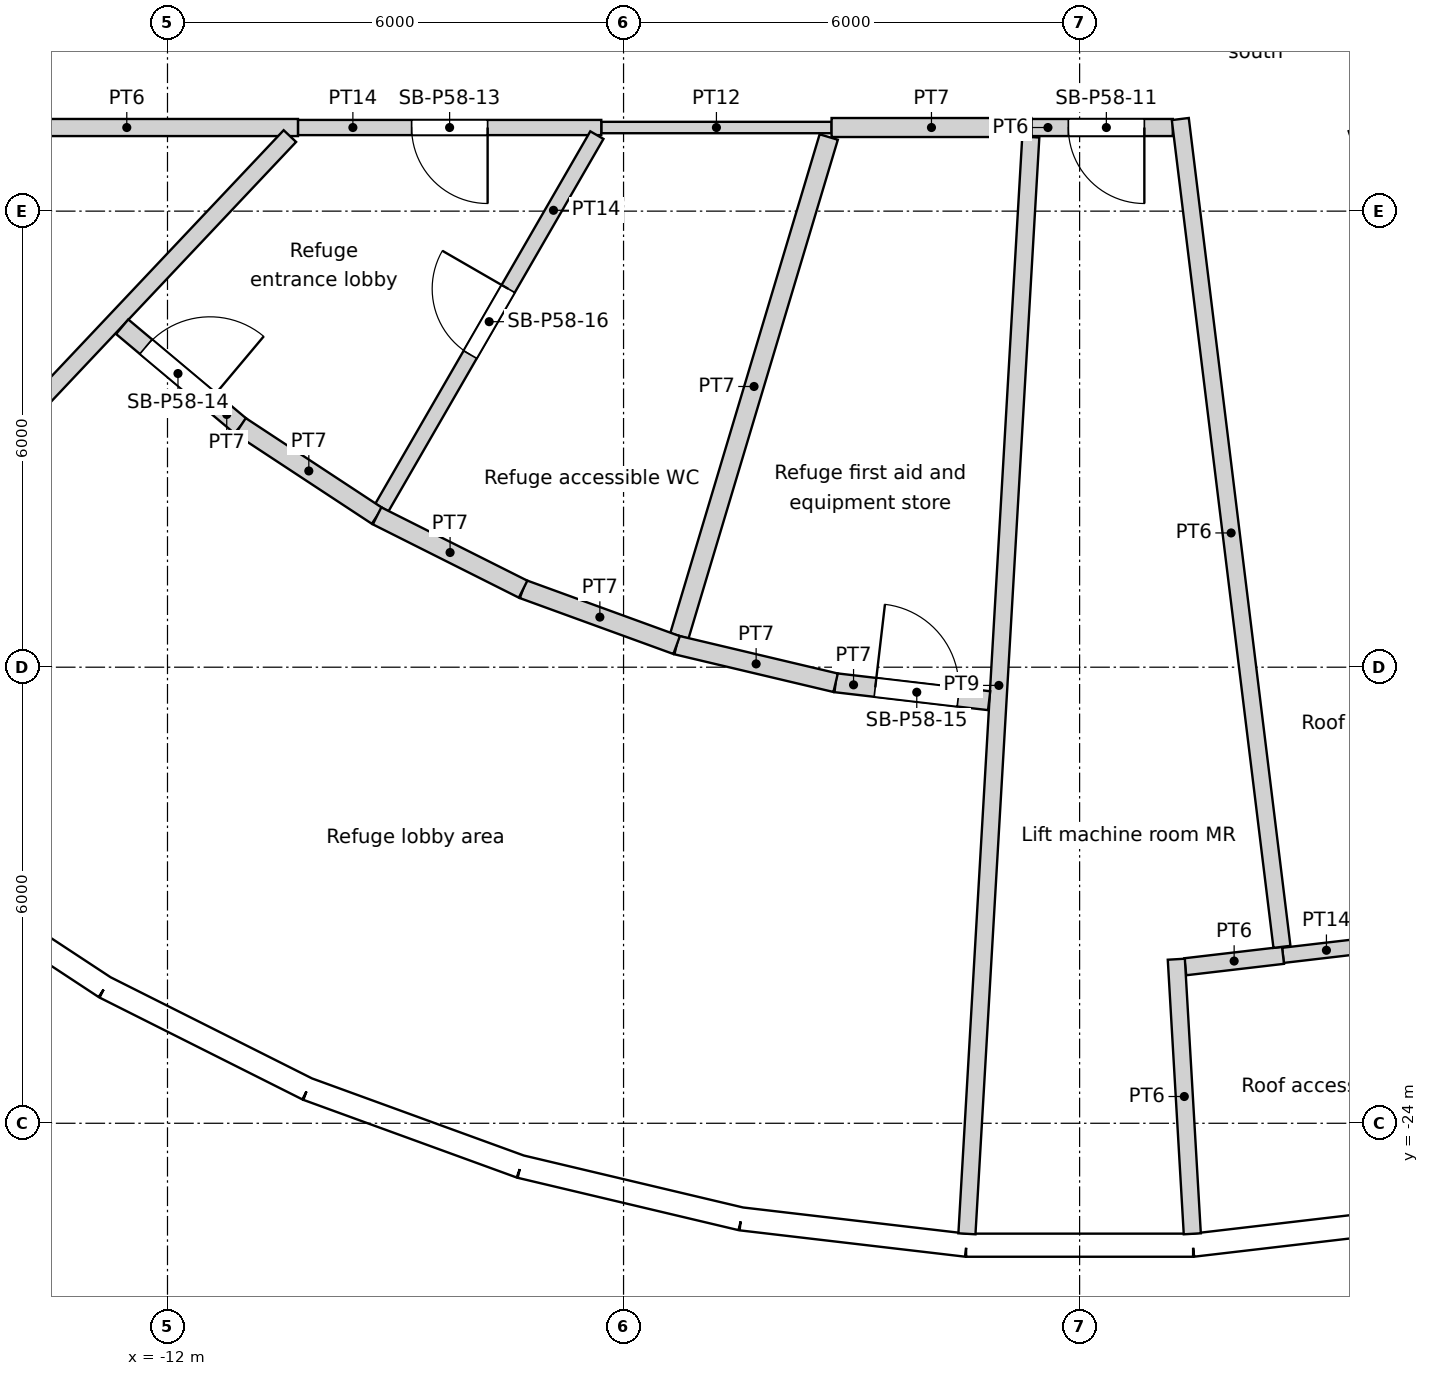
"""IFC4 building model, lengths in metres.
Left out: names, types, materials, properties, quantities, classifications, styles, units other than length and angle.
Written with IfcOpenShell. Run it as: python <this file> out.ifc"""

import sys

from ifc_helpers import new_model, si_unit, direction, frame, frame_2d, origin, origin_2d, place, context, subcontext, project, spatial, rectangle, circle, extrude, element, fill, save


model = new_model("IFC4")
c1 = context("Model", 3, precision=1e-05, world=origin(), true_north=direction((0.0, 1.0)))
c2 = subcontext(c1, "Body", "Model", "MODEL_VIEW")
j1 = project(units=[si_unit("LENGTHUNIT", "METRE"), si_unit("PLANEANGLEUNIT", "RADIAN")], contexts=[c1])
p1 = place(None, origin())
s1 = spatial("IfcSite", under=j1, at=p1, CompositionType="ELEMENT")
p2 = place(p1, origin())
s2 = spatial("IfcBuilding", under=s1, at=p2, CompositionType="ELEMENT")
p3 = place(p2, frame((0.0, 0.0, 225.0)))
s3 = spatial("IfcBuildingStorey", under=s2, at=p3, CompositionType="ELEMENT", Elevation=225.0)
for number, where, z_axis, x_axis in (
    (1, (-12.274, -21.259, 0.0), (0.0, 0.0, 1.0), (1.0, 0.0, 0.0)),
    (2, (-7.04, -23.516, 0.0), (0.0, 0.0, 1.0), (1.0, 0.0, 0.0)),
    (3, (-1.427, -24.506, 0.0), (0.0, 0.0, 1.0), (1.0, 0.0, 0.0)),
):
    element("IfcColumn", number, at=place(p3, frame(where, z_axis=z_axis, x_axis=x_axis)), inside=s3, PredefinedType="COLUMN", context=c2, shape_type="SweptSolid", body=[
        extrude(circle(Radius=0.6, at=origin_2d()), origin(), (0.0, 0.0, 1.0), 6.0),
    ])
for number, where, z_axis, x_axis in (
    (4, (-13.798, -12.802, 0.0), (0.0, 0.0, 1.0), (1.0, 0.0, 0.0)),
    (5, (-9.411, -16.301, 0.0), (0.0, 0.0, 1.0), (1.0, 0.0, 0.0)),
    (6, (-4.188, -18.35, 0.0), (0.0, 0.0, 1.0), (1.0, 0.0, 0.0)),
    (7, (1.406, -18.77, 0.0), (0.0, 0.0, 1.0), (1.0, 0.0, 0.0)),
):
    element("IfcColumn", number, at=place(p3, frame(where, z_axis=z_axis, x_axis=x_axis)), inside=s3, PredefinedType="COLUMN", context=c2, shape_type="SweptSolid", body=[
        extrude(circle(Radius=0.65, at=origin_2d()), origin(), (0.0, 0.0, 1.0), 6.0),
    ])
p4 = place(p3, frame((-15.316, -20.573, 0.0), z_axis=(0.0, 0.0, 1.0), x_axis=(0.835497187922, -0.549494721517, 0.0)))
e8 = element("IfcWall", 8, at=p4, inside=s3, PredefinedType="SOLIDWALL", context=c2, shape_type="SweptSolid", body=[
    extrude(rectangle(XDim=2.983, YDim=0.3, at=frame_2d((1.491, 0.0))), origin(), (0.0, 0.0, 1.0), 5.65),
])
p5 = place(p4, frame((1.491, 0.0, 1.825)))
e9 = element("IfcOpeningElement", 9, at=p5, cuts=e8, PredefinedType="OPENING", context=c2, shape_type="SweptSolid", body=[
    extrude(circle(Radius=1.2, at=origin_2d()), frame((0.0, 0.16, 0.0), z_axis=(0.0, -1.0, 0.0), x_axis=(1.0, 0.0, 0.0)), (0.0, 0.0, 1.0), 0.32),
])
p6 = place(p3, frame((-12.824, -22.211, 0.0), z_axis=(0.0, 0.0, 1.0), x_axis=(0.893656390984, -0.448751885626, 0.0)))
e10 = element("IfcWall", 10, at=p6, inside=s3, PredefinedType="SOLIDWALL", context=c2, shape_type="SweptSolid", body=[
    extrude(rectangle(XDim=2.982, YDim=0.3, at=frame_2d((1.491, 0.0))), origin(), (0.0, 0.0, 1.0), 5.65),
])
p7 = place(p6, frame((1.491, 0.0, 1.825)))
e11 = element("IfcOpeningElement", 11, at=p7, cuts=e10, PredefinedType="OPENING", context=c2, shape_type="SweptSolid", body=[
    extrude(circle(Radius=1.2, at=origin_2d()), frame((0.0, 0.16, 0.0), z_axis=(0.0, -1.0, 0.0), x_axis=(1.0, 0.0, 0.0)), (0.0, 0.0, 1.0), 0.32),
])
p8 = place(p3, frame((-10.158, -23.55, 0.0), z_axis=(0.0, 0.0, 1.0), x_axis=(0.939676264274, -0.342065079129, 0.0)))
e12 = element("IfcWall", 12, at=p8, inside=s3, PredefinedType="SOLIDWALL", context=c2, shape_type="SweptSolid", body=[
    extrude(rectangle(XDim=2.983, YDim=0.3, at=frame_2d((1.491, 0.0))), origin(), (0.0, 0.0, 1.0), 5.65),
])
p9 = place(p8, frame((1.491, 0.0, 1.825)))
e13 = element("IfcOpeningElement", 13, at=p9, cuts=e12, PredefinedType="OPENING", context=c2, shape_type="SweptSolid", body=[
    extrude(circle(Radius=1.2, at=origin_2d()), frame((0.0, 0.16, 0.0), z_axis=(0.0, -1.0, 0.0), x_axis=(1.0, 0.0, 0.0)), (0.0, 0.0, 1.0), 0.32),
])
p10 = place(p3, frame((-7.356, -24.57, 0.0), z_axis=(0.0, 0.0, 1.0), x_axis=(0.973049843813, -0.230594886012, 0.0)))
e14 = element("IfcWall", 14, at=p10, inside=s3, PredefinedType="SOLIDWALL", context=c2, shape_type="SweptSolid", body=[
    extrude(rectangle(XDim=2.982, YDim=0.3, at=frame_2d((1.491, 0.0))), origin(), (0.0, 0.0, 1.0), 5.65),
])
p11 = place(p10, frame((1.491, 0.0, 1.825)))
e15 = element("IfcOpeningElement", 15, at=p11, cuts=e14, PredefinedType="OPENING", context=c2, shape_type="SweptSolid", body=[
    extrude(circle(Radius=1.2, at=origin_2d()), frame((0.0, 0.16, 0.0), z_axis=(0.0, -1.0, 0.0), x_axis=(1.0, 0.0, 0.0)), (0.0, 0.0, 1.0), 0.32),
])
p12 = place(p3, frame((-4.454, -25.258, 0.0), z_axis=(0.0, 0.0, 1.0), x_axis=(0.993240822844, -0.116071821888, 0.0)))
e16 = element("IfcWall", 16, at=p12, inside=s3, PredefinedType="SOLIDWALL", context=c2, shape_type="SweptSolid", body=[
    extrude(rectangle(XDim=2.983, YDim=0.3, at=frame_2d((1.491, 0.0))), origin(), (0.0, 0.0, 1.0), 5.65),
])
p13 = place(p12, frame((1.491, 0.0, 1.825)))
e17 = element("IfcOpeningElement", 17, at=p13, cuts=e16, PredefinedType="OPENING", context=c2, shape_type="SweptSolid", body=[
    extrude(circle(Radius=1.2, at=origin_2d()), frame((0.0, 0.16, 0.0), z_axis=(0.0, -1.0, 0.0), x_axis=(1.0, 0.0, 0.0)), (0.0, 0.0, 1.0), 0.32),
])
p14 = place(p3, frame((-1.491, -25.604, 0.0), z_axis=(0.0, 0.0, 1.0), x_axis=(1.0, 0.0, 0.0)))
e18 = element("IfcWall", 18, at=p14, inside=s3, PredefinedType="SOLIDWALL", context=c2, shape_type="SweptSolid", body=[
    extrude(rectangle(XDim=2.982, YDim=0.3, at=frame_2d((1.491, 0.0))), origin(), (0.0, 0.0, 1.0), 5.65),
])
p15 = place(p14, frame((1.491, 0.0, 1.825)))
e19 = element("IfcOpeningElement", 19, at=p15, cuts=e18, PredefinedType="OPENING", context=c2, shape_type="SweptSolid", body=[
    extrude(circle(Radius=1.2, at=origin_2d()), frame((0.0, 0.16, 0.0), z_axis=(0.0, -1.0, 0.0), x_axis=(1.0, 0.0, 0.0)), (0.0, 0.0, 1.0), 0.32),
])
p16 = place(p3, frame((1.491, -25.604, 0.0), z_axis=(0.0, 0.0, 1.0), x_axis=(0.993240822844, 0.116071821888, 0.0)))
e20 = element("IfcWall", 20, at=p16, inside=s3, PredefinedType="SOLIDWALL", context=c2, shape_type="SweptSolid", body=[
    extrude(rectangle(XDim=2.983, YDim=0.3, at=frame_2d((1.491, 0.0))), origin(), (0.0, 0.0, 1.0), 5.65),
])
p17 = place(p16, frame((1.491, 0.0, 1.825)))
e21 = element("IfcOpeningElement", 21, at=p17, cuts=e20, PredefinedType="OPENING", context=c2, shape_type="SweptSolid", body=[
    extrude(circle(Radius=1.2, at=origin_2d()), frame((0.0, 0.16, 0.0), z_axis=(0.0, -1.0, 0.0), x_axis=(1.0, 0.0, 0.0)), (0.0, 0.0, 1.0), 0.32),
])
p18 = place(p3, frame((-17.497, -18.546, 0.0), z_axis=(0.0, 0.0, 1.0), x_axis=(0.686253135809, 0.727362793654, 0.0)))
e22 = element("IfcWall", 22, at=p18, inside=s3, PredefinedType="PARTITIONING", context=c2, shape_type="SweptSolid", body=[
    extrude(rectangle(XDim=10.357, YDim=0.225, at=frame_2d((5.179, 0.0))), origin(), (0.0, 0.0, 1.0), 2.7),
])
p19 = place(p3, frame((-14.788, -10.9, 0.0), z_axis=(0.0, 0.0, 1.0), x_axis=(1.0, 0.0, 0.0)))
e23 = element("IfcWall", 23, at=p19, inside=s3, PredefinedType="PARTITIONING", context=c2, shape_type="SweptSolid", body=[
    extrude(rectangle(XDim=4.504, YDim=0.225, at=frame_2d((2.252, 0.0))), origin(), (0.0, 0.0, 1.0), 5.2),
])
p20 = place(p3, frame((-11.039, -14.827, 0.0), z_axis=(0.0, 0.0, 1.0), x_axis=(-0.766021768974, 0.642814630713, 0.0)))
e24 = element("IfcWall", 24, at=p20, inside=s3, PredefinedType="PARTITIONING", context=c2, shape_type="SweptSolid", body=[
    extrude(rectangle(XDim=2.033, YDim=0.25, at=frame_2d((1.017, 0.0))), origin(), (0.0, 0.0, 1.0), 5.2),
])
p21 = place(p20, frame((0.525, 0.0, 0.0)))
e25 = element("IfcOpeningElement", 25, at=p21, cuts=e24, PredefinedType="OPENING", context=c2, shape_type="SweptSolid", body=[
    extrude(rectangle(XDim=1.1, YDim=2.1, at=frame_2d((0.55, 1.05))), frame((0.0, 0.125, 0.0), z_axis=(0.0, -1.0, 0.0), x_axis=(1.0, 0.0, 0.0)), (0.0, 0.0, 1.0), 0.25),
])
p22 = place(p3, frame((-11.039, -14.827, 0.0), z_axis=(0.0, 0.0, 1.0), x_axis=(0.835476081401, -0.549526812274, 0.0)))
e26 = element("IfcWall", 26, at=p22, inside=s3, PredefinedType="PARTITIONING", context=c2, shape_type="SweptSolid", body=[
    extrude(rectangle(XDim=2.15, YDim=0.25, at=frame_2d((1.075, 0.0))), origin(), (0.0, 0.0, 1.0), 5.2),
])
p23 = place(p3, frame((-10.284, -10.9, 0.0), z_axis=(0.0, 0.0, 1.0), x_axis=(1.0, 0.0, 0.0)))
e27 = element("IfcWall", 27, at=p23, inside=s3, PredefinedType="PARTITIONING", context=c2, shape_type="SweptSolid", body=[
    extrude(rectangle(XDim=3.99, YDim=0.2, at=frame_2d((1.995, 0.0))), origin(), (0.0, 0.0, 1.0), 5.2),
])
p24 = place(p23, frame((1.495, 0.0, 0.0)))
e28 = element("IfcOpeningElement", 28, at=p24, cuts=e27, PredefinedType="OPENING", context=c2, shape_type="SweptSolid", body=[
    extrude(rectangle(XDim=1.0, YDim=2.1, at=frame_2d((0.5, 1.05))), frame((0.0, 0.1, 0.0), z_axis=(0.0, -1.0, 0.0), x_axis=(1.0, 0.0, 0.0)), (0.0, 0.0, 1.0), 0.2),
])
p25 = place(p3, frame((-9.243, -16.009, 0.0), z_axis=(0.0, 0.0, 1.0), x_axis=(0.893653507888, -0.448757627055, 0.0)))
e29 = element("IfcWall", 29, at=p25, inside=s3, PredefinedType="PARTITIONING", context=c2, shape_type="SweptSolid", body=[
    extrude(rectangle(XDim=2.149, YDim=0.25, at=frame_2d((1.075, 0.0))), origin(), (0.0, 0.0, 1.0), 5.2),
])
p26 = place(p3, frame((-6.351, -11.0, 0.0), z_axis=(0.0, 0.0, 1.0), x_axis=(-0.500013765421, -0.866017456169, 0.0)))
e30 = element("IfcWall", 30, at=p26, inside=s3, PredefinedType="PARTITIONING", context=c2, shape_type="SweptSolid", body=[
    extrude(rectangle(XDim=5.658, YDim=0.2, at=frame_2d((2.829, 0.0))), origin(), (0.0, 0.0, 1.0), 5.2),
])
p27 = place(p26, frame((2.334, 0.0, 0.0)))
e31 = element("IfcOpeningElement", 31, at=p27, cuts=e30, PredefinedType="OPENING", context=c2, shape_type="SweptSolid", body=[
    extrude(rectangle(XDim=1.0, YDim=2.1, at=frame_2d((0.5, 1.05))), frame((0.0, 0.1, 0.0), z_axis=(0.0, -1.0, 0.0), x_axis=(1.0, 0.0, 0.0)), (0.0, 0.0, 1.0), 0.2),
])
p28 = place(p3, frame((-7.322, -16.973, 0.0), z_axis=(0.0, 0.0, 1.0), x_axis=(0.93967399384, -0.342071316104, 0.0)))
e32 = element("IfcWall", 32, at=p28, inside=s3, PredefinedType="PARTITIONING", context=c2, shape_type="SweptSolid", body=[
    extrude(rectangle(XDim=2.15, YDim=0.25, at=frame_2d((1.075, 0.0))), origin(), (0.0, 0.0, 1.0), 5.2),
])
p29 = place(p3, frame((-6.293, -10.9, 0.0), z_axis=(0.0, 0.0, 1.0), x_axis=(1.0, 0.0, 0.0)))
e33 = element("IfcWall", 33, at=p29, inside=s3, PredefinedType="PARTITIONING", context=c2, shape_type="SweptSolid", body=[
    extrude(rectangle(XDim=3.03, YDim=0.15, at=frame_2d((1.515, 0.0))), origin(), (0.0, 0.0, 1.0), 5.2),
])
p30 = place(p3, frame((-5.266, -17.589, 0.0), z_axis=(0.0, 0.0, 1.0), x_axis=(0.286831354486, 0.957981092759, 0.0)))
e34 = element("IfcWall", 34, at=p30, inside=s3, PredefinedType="PARTITIONING", context=c2, shape_type="SweptSolid", body=[
    extrude(rectangle(XDim=6.852, YDim=0.25, at=frame_2d((3.426, 0.0))), origin(), (0.0, 0.0, 1.0), 5.2),
])
p31 = place(p3, frame((-5.302, -17.709, 0.0), z_axis=(0.0, 0.0, 1.0), x_axis=(0.973036034562, -0.230653149649, 0.0)))
e35 = element("IfcWall", 35, at=p31, inside=s3, PredefinedType="PARTITIONING", context=c2, shape_type="SweptSolid", body=[
    extrude(rectangle(XDim=2.15, YDim=0.25, at=frame_2d((1.075, 0.0))), origin(), (0.0, 0.0, 1.0), 5.2),
])
p32 = place(p3, frame((-3.263, -10.9, 0.0), z_axis=(0.0, 0.0, 1.0), x_axis=(1.0, 0.0, 0.0)))
e36 = element("IfcWall", 36, at=p32, inside=s3, PredefinedType="PARTITIONING", context=c2, shape_type="SweptSolid", body=[
    extrude(rectangle(XDim=2.628, YDim=0.25, at=frame_2d((1.314, 0.0))), origin(), (0.0, 0.0, 1.0), 5.2),
])
p33 = place(p3, frame((-3.21, -18.205, 0.0), z_axis=(0.0, 0.0, 1.0), x_axis=(0.993238011892, -0.116095873021, 0.0)))
e37 = element("IfcWall", 37, at=p33, inside=s3, PredefinedType="PARTITIONING", context=c2, shape_type="SweptSolid", body=[
    extrude(rectangle(XDim=2.033, YDim=0.25, at=frame_2d((1.017, 0.0))), origin(), (0.0, 0.0, 1.0), 5.2),
])
p34 = place(p33, frame((0.525, 0.0, 0.0)))
e38 = element("IfcOpeningElement", 38, at=p34, cuts=e37, PredefinedType="OPENING", context=c2, shape_type="SweptSolid", body=[
    extrude(rectangle(XDim=1.1, YDim=2.1, at=frame_2d((0.55, 1.05))), frame((0.0, 0.125, 0.0), z_axis=(0.0, -1.0, 0.0), x_axis=(1.0, 0.0, 0.0)), (0.0, 0.0, 1.0), 0.25),
])
p35 = place(p3, frame((-1.482, -25.454, 0.0), z_axis=(0.0, 0.0, 1.0), x_axis=(0.058139787004, 0.998308451916, 0.0)))
e39 = element("IfcWall", 39, at=p35, inside=s3, PredefinedType="PARTITIONING", context=c2, shape_type="SweptSolid", body=[
    extrude(rectangle(XDim=14.454, YDim=0.225, at=frame_2d((7.227, 0.0))), origin(), (0.0, 0.0, 1.0), 2.7),
])
p36 = place(p3, frame((-0.635, -10.9, 0.0), z_axis=(0.0, 0.0, 1.0), x_axis=(1.0, 0.0, 0.0)))
e40 = element("IfcWall", 40, at=p36, inside=s3, PredefinedType="PARTITIONING", context=c2, shape_type="SweptSolid", body=[
    extrude(rectangle(XDim=1.861, YDim=0.225, at=frame_2d((0.93, 0.0))), origin(), (0.0, 0.0, 1.0), 5.2),
])
p37 = place(p36, frame((0.487, 0.0, 0.0)))
e41 = element("IfcOpeningElement", 41, at=p37, cuts=e40, PredefinedType="OPENING", context=c2, shape_type="SweptSolid", body=[
    extrude(rectangle(XDim=1.0, YDim=2.1, at=frame_2d((0.5, 1.05))), frame((0.0, 0.113, 0.0), z_axis=(0.0, -1.0, 0.0), x_axis=(1.0, 0.0, 0.0)), (0.0, 0.0, 1.0), 0.225),
])
p38 = place(p3, frame((1.39, -21.941, 0.0), z_axis=(0.0, 0.0, 1.0), x_axis=(0.993246843988, 0.11602028662, 0.0)))
e42 = element("IfcWall", 42, at=p38, inside=s3, PredefinedType="PARTITIONING", context=c2, shape_type="SweptSolid", body=[
    extrude(rectangle(XDim=1.294, YDim=0.225, at=frame_2d((0.647, 0.0))), origin(), (0.0, 0.0, 1.0), 5.2),
])
p39 = place(p3, frame((1.482, -25.454, 0.0), z_axis=(0.0, 0.0, 1.0), x_axis=(-0.058093127589, 0.998311168187, 0.0)))
e43 = element("IfcWall", 43, at=p39, inside=s3, PredefinedType="PARTITIONING", context=c2, shape_type="SweptSolid", body=[
    extrude(rectangle(XDim=3.618, YDim=0.225, at=frame_2d((1.809, 0.0))), origin(), (0.0, 0.0, 1.0), 5.2),
])
p40 = place(p3, frame((2.662, -21.679, 0.0), z_axis=(0.0, 0.0, 1.0), x_axis=(-0.121884764191, 0.992544258085, 0.0)))
e44 = element("IfcWall", 44, at=p40, inside=s3, PredefinedType="PARTITIONING", context=c2, shape_type="SweptSolid", body=[
    extrude(rectangle(XDim=10.973, YDim=0.225, at=frame_2d((5.486, 0.0))), origin(), (0.0, 0.0, 1.0), 5.2),
])
p41 = place(p3, frame((2.676, -21.791, 0.0), z_axis=(0.0, 0.0, 1.0), x_axis=(0.99324154859, 0.116065611425, 0.0)))
e45 = element("IfcWall", 45, at=p41, inside=s3, PredefinedType="PARTITIONING", context=c2, shape_type="SweptSolid", body=[
    extrude(rectangle(XDim=1.151, YDim=0.2, at=frame_2d((0.575, 0.0))), origin(), (0.0, 0.0, 1.0), 5.2),
])
p42 = place(p3, frame((7.076, -20.947, 0.0), z_axis=(0.0, 0.0, 1.0), x_axis=(-0.320044465118, 0.947402522874, 0.0)))
e46 = element("IfcWall", 46, at=p42, inside=s3, PredefinedType="PARTITIONING", context=c2, shape_type="SweptSolid", body=[
    extrude(rectangle(XDim=10.605, YDim=0.3, at=frame_2d((5.302, 0.0))), origin(), (0.0, 0.0, 1.0), 5.2),
])
p43 = place(p5, origin())
e47 = element("IfcWindow", 47, at=p43, inside=s3, PartitioningType="SINGLE_PANEL", PredefinedType="WINDOW", context=c2, shape_type="SweptSolid", body=[
    extrude(circle(Radius=1.2, at=origin_2d()), frame((0.0, 0.12, 0.0), z_axis=(0.0, -1.0, 0.0), x_axis=(1.0, 0.0, 0.0)), (0.0, 0.0, 1.0), 0.1),
])
fill(e9, e47)
p44 = place(p7, origin())
e48 = element("IfcWindow", 48, at=p44, inside=s3, PartitioningType="SINGLE_PANEL", PredefinedType="WINDOW", context=c2, shape_type="SweptSolid", body=[
    extrude(circle(Radius=1.2, at=origin_2d()), frame((0.0, 0.12, 0.0), z_axis=(0.0, -1.0, 0.0), x_axis=(1.0, 0.0, 0.0)), (0.0, 0.0, 1.0), 0.1),
])
fill(e11, e48)
p45 = place(p9, origin())
e49 = element("IfcWindow", 49, at=p45, inside=s3, PartitioningType="SINGLE_PANEL", PredefinedType="WINDOW", context=c2, shape_type="SweptSolid", body=[
    extrude(circle(Radius=1.2, at=origin_2d()), frame((0.0, 0.12, 0.0), z_axis=(0.0, -1.0, 0.0), x_axis=(1.0, 0.0, 0.0)), (0.0, 0.0, 1.0), 0.1),
])
fill(e13, e49)
p46 = place(p11, origin())
e50 = element("IfcWindow", 50, at=p46, inside=s3, PartitioningType="SINGLE_PANEL", PredefinedType="WINDOW", context=c2, shape_type="SweptSolid", body=[
    extrude(circle(Radius=1.2, at=origin_2d()), frame((0.0, 0.12, 0.0), z_axis=(0.0, -1.0, 0.0), x_axis=(1.0, 0.0, 0.0)), (0.0, 0.0, 1.0), 0.1),
])
fill(e15, e50)
p47 = place(p13, origin())
e51 = element("IfcWindow", 51, at=p47, inside=s3, PartitioningType="SINGLE_PANEL", PredefinedType="WINDOW", context=c2, shape_type="SweptSolid", body=[
    extrude(circle(Radius=1.2, at=origin_2d()), frame((0.0, 0.12, 0.0), z_axis=(0.0, -1.0, 0.0), x_axis=(1.0, 0.0, 0.0)), (0.0, 0.0, 1.0), 0.1),
])
fill(e17, e51)
p48 = place(p15, origin())
e52 = element("IfcWindow", 52, at=p48, inside=s3, PartitioningType="SINGLE_PANEL", PredefinedType="WINDOW", context=c2, shape_type="SweptSolid", body=[
    extrude(circle(Radius=1.2, at=origin_2d()), frame((0.0, 0.12, 0.0), z_axis=(0.0, -1.0, 0.0), x_axis=(1.0, 0.0, 0.0)), (0.0, 0.0, 1.0), 0.1),
])
fill(e19, e52)
p49 = place(p17, origin())
e53 = element("IfcWindow", 53, at=p49, inside=s3, PartitioningType="SINGLE_PANEL", PredefinedType="WINDOW", context=c2, shape_type="SweptSolid", body=[
    extrude(circle(Radius=1.2, at=origin_2d()), frame((0.0, 0.12, 0.0), z_axis=(0.0, -1.0, 0.0), x_axis=(1.0, 0.0, 0.0)), (0.0, 0.0, 1.0), 0.1),
])
fill(e21, e53)
p50 = place(p37, origin())
e54 = element("IfcDoor", 54, at=p50, inside=s3, OperationType="SINGLE_SWING_LEFT", PredefinedType="DOOR", context=c2, shape_type="SweptSolid", body=[
    extrude(rectangle(XDim=1.0, YDim=2.1, at=frame_2d((0.5, 1.05))), frame((0.0, 0.025, 0.0), z_axis=(0.0, -1.0, 0.0), x_axis=(1.0, 0.0, 0.0)), (0.0, 0.0, 1.0), 0.05),
])
fill(e41, e54)
p51 = place(p24, origin())
e55 = element("IfcDoor", 55, at=p51, inside=s3, OperationType="SINGLE_SWING_LEFT", PredefinedType="DOOR", context=c2, shape_type="SweptSolid", body=[
    extrude(rectangle(XDim=1.0, YDim=2.1, at=frame_2d((0.5, 1.05))), frame((0.0, 0.025, 0.0), z_axis=(0.0, -1.0, 0.0), x_axis=(1.0, 0.0, 0.0)), (0.0, 0.0, 1.0), 0.05),
])
fill(e28, e55)
p52 = place(p21, origin())
e56 = element("IfcDoor", 56, at=p52, inside=s3, OperationType="SINGLE_SWING_RIGHT", PredefinedType="DOOR", context=c2, shape_type="SweptSolid", body=[
    extrude(rectangle(XDim=1.1, YDim=2.1, at=frame_2d((0.55, 1.05))), frame((0.0, 0.025, 0.0), z_axis=(0.0, -1.0, 0.0), x_axis=(1.0, 0.0, 0.0)), (0.0, 0.0, 1.0), 0.05),
])
fill(e25, e56)
p53 = place(p34, origin())
e57 = element("IfcDoor", 57, at=p53, inside=s3, OperationType="SINGLE_SWING_LEFT", PredefinedType="DOOR", context=c2, shape_type="SweptSolid", body=[
    extrude(rectangle(XDim=1.1, YDim=2.1, at=frame_2d((0.55, 1.05))), frame((0.0, 0.025, 0.0), z_axis=(0.0, -1.0, 0.0), x_axis=(1.0, 0.0, 0.0)), (0.0, 0.0, 1.0), 0.05),
])
fill(e38, e57)
p54 = place(p27, origin())
e58 = element("IfcDoor", 58, at=p54, inside=s3, OperationType="SINGLE_SWING_RIGHT", PredefinedType="DOOR", context=c2, shape_type="SweptSolid", body=[
    extrude(rectangle(XDim=1.0, YDim=2.1, at=frame_2d((0.5, 1.05))), frame((0.0, 0.025, 0.0), z_axis=(0.0, -1.0, 0.0), x_axis=(1.0, 0.0, 0.0)), (0.0, 0.0, 1.0), 0.05),
])
fill(e31, e58)
save(model, sys.argv[1])
